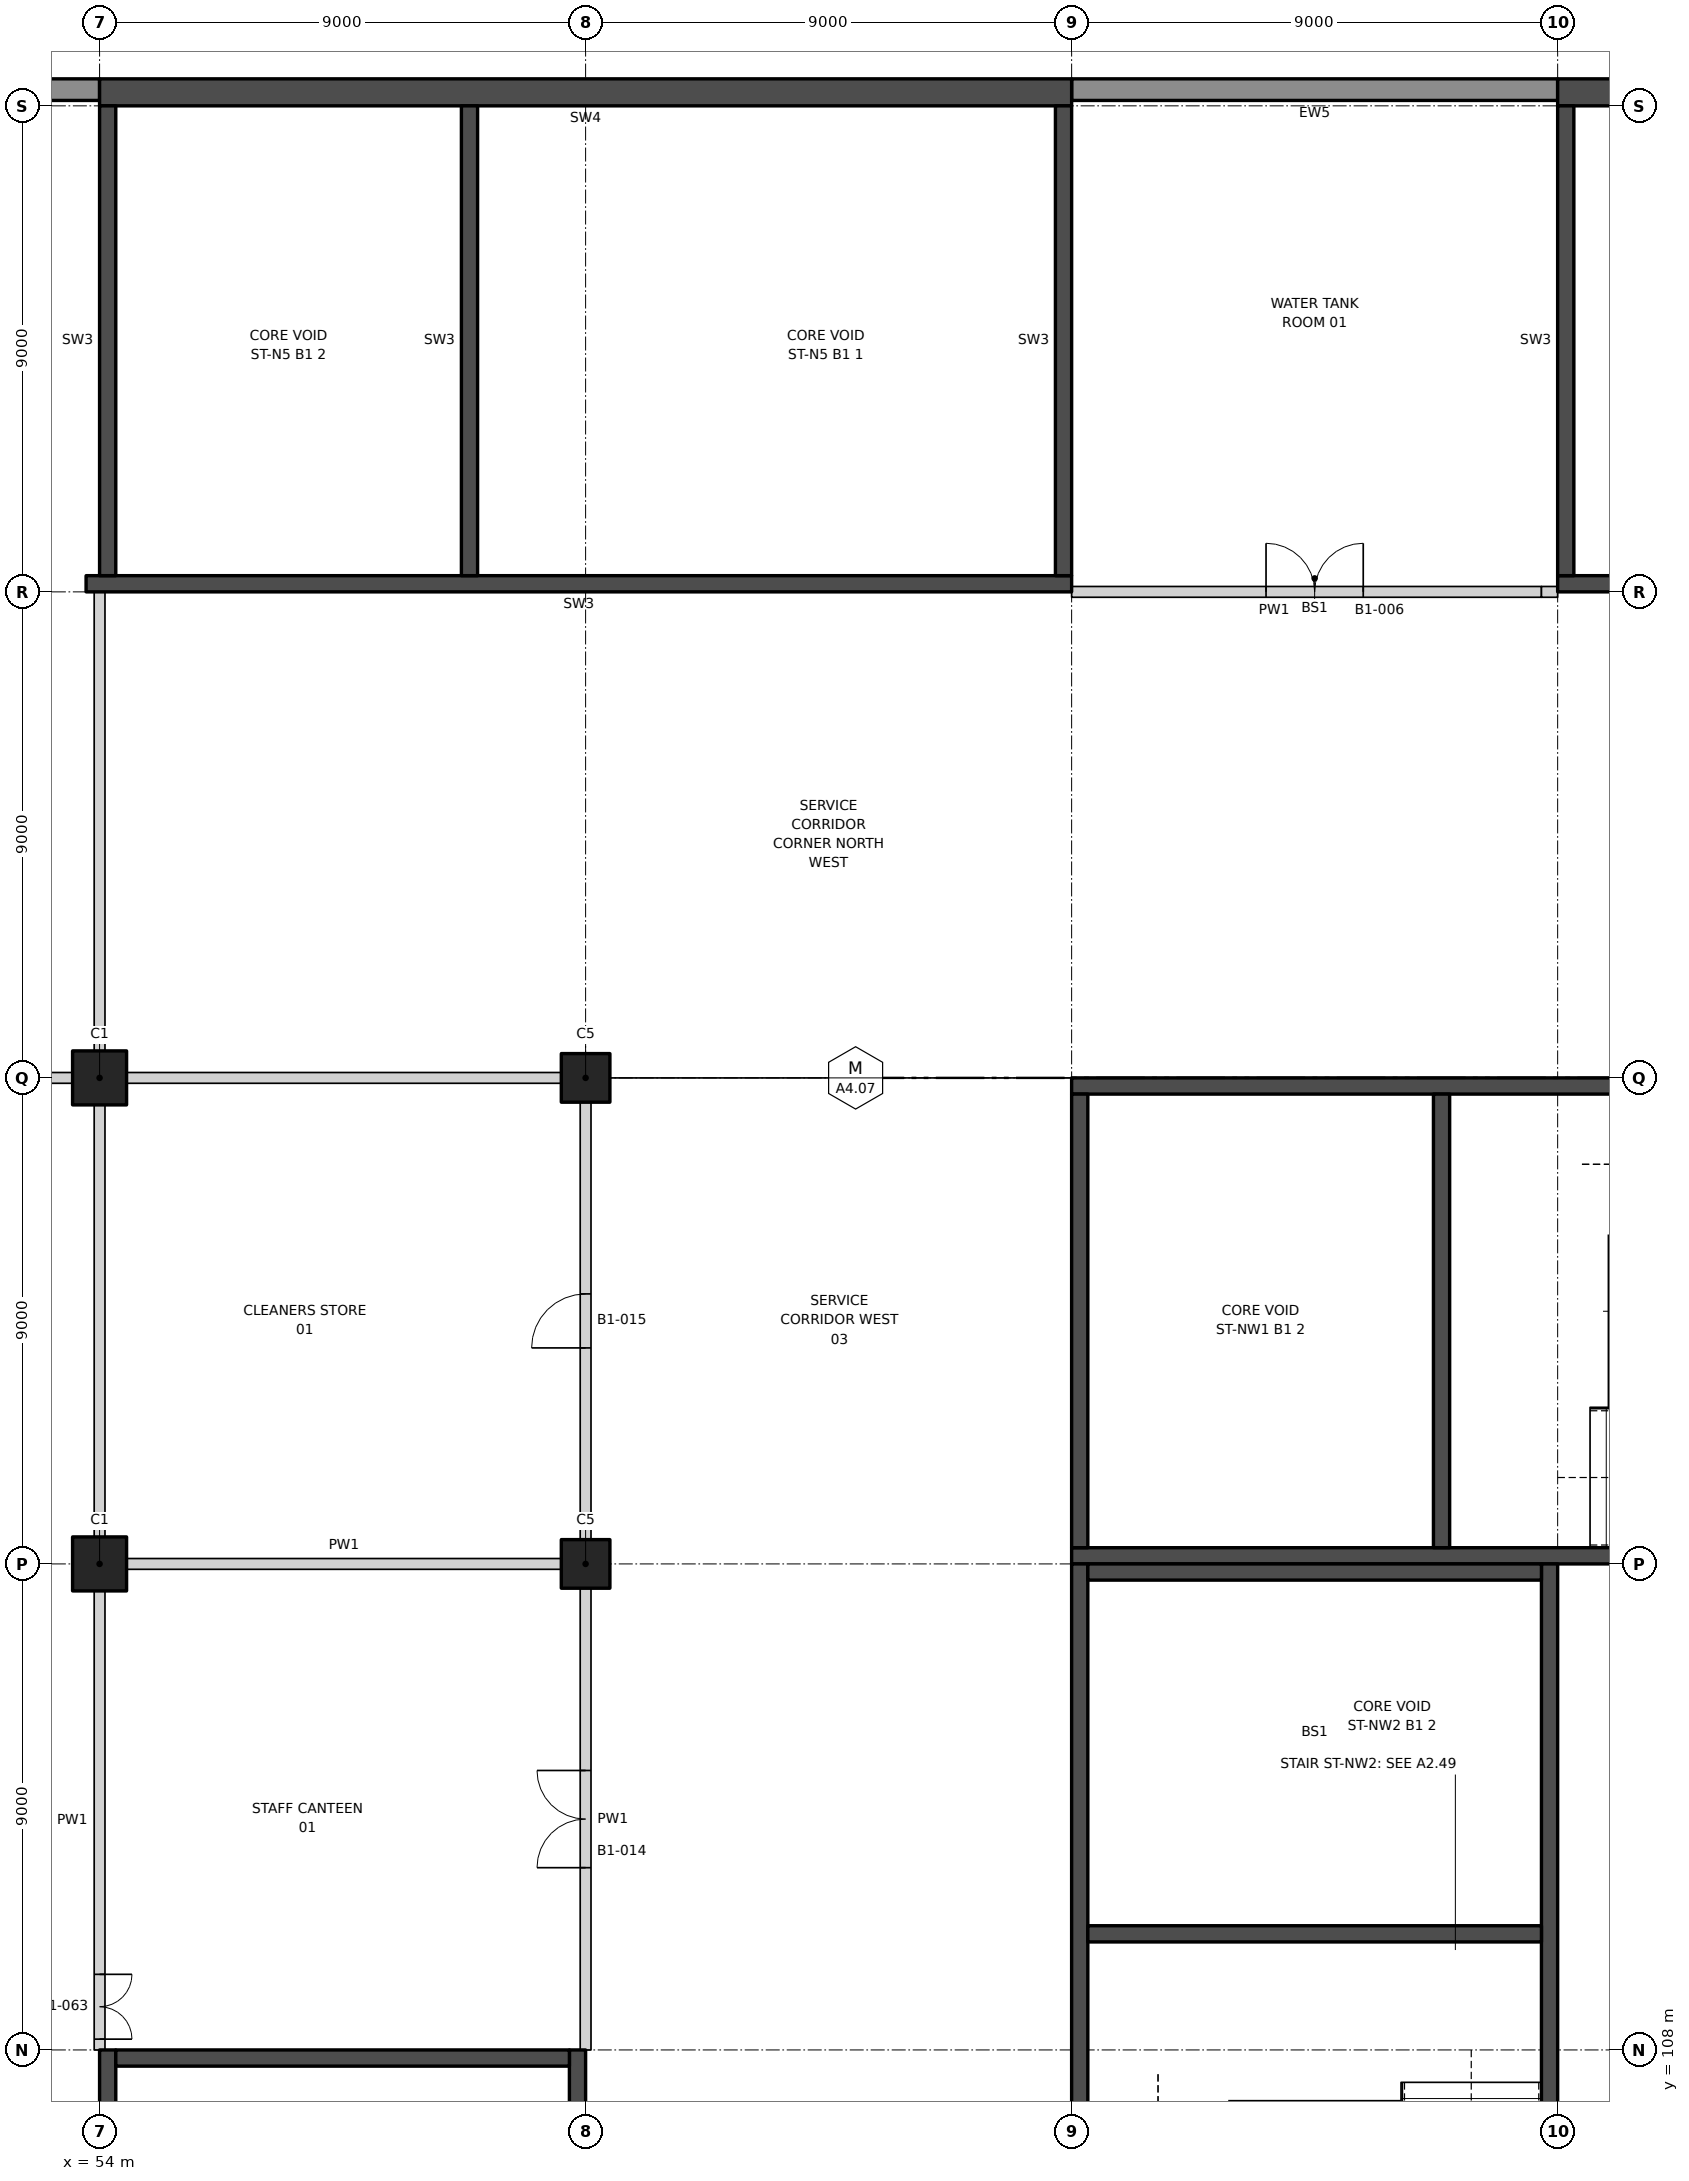
"""IFC4 building model, lengths in metres.
Left out: names, types, materials, properties, quantities, classifications, styles, units other than length and angle.
Written with IfcOpenShell. Run it as: python <this file> out.ifc"""

import sys

from ifc_helpers import new_model, si_unit, direction, frame, frame_2d, origin, origin_2d, place, context, subcontext, project, spatial, rectangle, extrude, element, fill, save


model = new_model("IFC4")
c1 = context("Model", 3, precision=1e-05, world=origin(), true_north=direction((0.0, 1.0)))
c2 = subcontext(c1, "Body", "Model", "MODEL_VIEW")
j1 = project(units=[si_unit("LENGTHUNIT", "METRE"), si_unit("PLANEANGLEUNIT", "RADIAN")], contexts=[c1])
p1 = place(None, origin())
s1 = spatial("IfcSite", under=j1, at=p1, CompositionType="ELEMENT")
p2 = place(p1, origin())
s2 = spatial("IfcBuilding", under=s1, at=p2, CompositionType="ELEMENT")
p3 = place(p2, frame((0.0, 0.0, -6.0)))
s3 = spatial("IfcBuildingStorey", under=s2, at=p3, CompositionType="ELEMENT", Elevation=-6.0)
for number, where, z_axis, x_axis in (
    (1, (54.0, 117.0, 0.0), (0.0, 0.0, 1.0), (1.0, 0.0, 0.0)),
    (2, (54.0, 126.0, 0.0), (0.0, 0.0, 1.0), (1.0, 0.0, 0.0)),
):
    element("IfcColumn", number, at=place(p3, frame(where, z_axis=z_axis, x_axis=x_axis)), inside=s3, PredefinedType="COLUMN", context=c2, shape_type="SweptSolid", body=[
        extrude(rectangle(XDim=1.0, YDim=1.0, at=origin_2d()), origin(), (0.0, 0.0, 1.0), 6.0),
    ])
for number, where, z_axis, x_axis in (
    (3, (63.0, 117.0, 0.0), (0.0, 0.0, 1.0), (1.0, 0.0, 0.0)),
    (4, (63.0, 126.0, 0.0), (0.0, 0.0, 1.0), (1.0, 0.0, 0.0)),
):
    element("IfcColumn", number, at=place(p3, frame(where, z_axis=z_axis, x_axis=x_axis)), inside=s3, PredefinedType="COLUMN", context=c2, shape_type="SweptSolid", body=[
        extrude(rectangle(XDim=0.9, YDim=0.9, at=origin_2d()), origin(), (0.0, 0.0, 1.0), 6.0),
    ])
for number, where, z_axis, x_axis in (
    (5, (54.5, 117.0, 0.0), (0.0, 0.0, 1.0), (1.0, 0.0, 0.0)),
    (6, (45.45, 126.0, 0.0), (0.0, 0.0, 1.0), (1.0, 0.0, 0.0)),
    (7, (54.5, 126.0, 0.0), (0.0, 0.0, 1.0), (1.0, 0.0, 0.0)),
):
    element("IfcWall", number, at=place(p3, frame(where, z_axis=z_axis, x_axis=x_axis)), inside=s3, PredefinedType="PARTITIONING", context=c2, shape_type="SweptSolid", body=[
        extrude(rectangle(XDim=8.05, YDim=0.2, at=frame_2d((4.025, 0.0))), origin(), (0.0, 0.0, 1.0), 4.65),
    ])
p4 = place(p3, frame((72.0, 135.0, 0.0), z_axis=(0.0, 0.0, 1.0), x_axis=(1.0, 0.0, 0.0)))
e8 = element("IfcWall", 8, at=p4, inside=s3, PredefinedType="PARTITIONING", context=c2, shape_type="SweptSolid", body=[
    extrude(rectangle(XDim=8.7, YDim=0.2, at=frame_2d((4.35, 0.0))), origin(), (0.0, 0.0, 1.0), 4.55),
])
p5 = place(p4, frame((3.6, 0.0, 0.0)))
e9 = element("IfcOpeningElement", 9, at=p5, cuts=e8, PredefinedType="OPENING", context=c2, shape_type="SweptSolid", body=[
    extrude(rectangle(XDim=1.8, YDim=2.1, at=frame_2d((0.9, 1.05))), frame((0.0, 0.11, 0.0), z_axis=(0.0, -1.0, 0.0), x_axis=(1.0, 0.0, 0.0)), (0.0, 0.0, 1.0), 0.22),
])
p6 = place(p3, frame((54.0, 108.0, 0.0), z_axis=(0.0, 0.0, 1.0), x_axis=(0.0, 1.0, 0.0)))
e10 = element("IfcWall", 10, at=p6, inside=s3, PredefinedType="PARTITIONING", context=c2, shape_type="SweptSolid", body=[
    extrude(rectangle(XDim=8.5, YDim=0.2, at=frame_2d((4.25, 0.0))), origin(), (0.0, 0.0, 1.0), 4.65),
])
p7 = place(p6, frame((0.2, 0.0, 0.0)))
e11 = element("IfcOpeningElement", 11, at=p7, cuts=e10, PredefinedType="OPENING", context=c2, shape_type="SweptSolid", body=[
    extrude(rectangle(XDim=1.2, YDim=2.1, at=frame_2d((0.6, 1.05))), frame((0.0, 0.11, 0.0), z_axis=(0.0, -1.0, 0.0), x_axis=(1.0, 0.0, 0.0)), (0.0, 0.0, 1.0), 0.22),
])
p8 = place(p3, frame((54.0, 117.5, 0.0), z_axis=(0.0, 0.0, 1.0), x_axis=(0.0, 1.0, 0.0)))
e12 = element("IfcWall", 12, at=p8, inside=s3, PredefinedType="PARTITIONING", context=c2, shape_type="SweptSolid", body=[
    extrude(rectangle(XDim=8.0, YDim=0.2, at=frame_2d((4.0, 0.0))), origin(), (0.0, 0.0, 1.0), 4.65),
])
p9 = place(p3, frame((54.0, 126.5, 0.0), z_axis=(0.0, 0.0, 1.0), x_axis=(0.0, 1.0, 0.0)))
e13 = element("IfcWall", 13, at=p9, inside=s3, PredefinedType="PARTITIONING", context=c2, shape_type="SweptSolid", body=[
    extrude(rectangle(XDim=8.5, YDim=0.2, at=frame_2d((4.25, 0.0))), origin(), (0.0, 0.0, 1.0), 4.65),
])
p10 = place(p3, frame((63.0, 108.0, 0.0), z_axis=(0.0, 0.0, 1.0), x_axis=(0.0, 1.0, 0.0)))
e14 = element("IfcWall", 14, at=p10, inside=s3, PredefinedType="PARTITIONING", context=c2, shape_type="SweptSolid", body=[
    extrude(rectangle(XDim=8.55, YDim=0.2, at=frame_2d((4.275, 0.0))), origin(), (0.0, 0.0, 1.0), 4.55),
])
p11 = place(p10, frame((3.375, 0.0, 0.0)))
e15 = element("IfcOpeningElement", 15, at=p11, cuts=e14, PredefinedType="OPENING", context=c2, shape_type="SweptSolid", body=[
    extrude(rectangle(XDim=1.8, YDim=2.1, at=frame_2d((0.9, 1.05))), frame((0.0, 0.11, 0.0), z_axis=(0.0, -1.0, 0.0), x_axis=(1.0, 0.0, 0.0)), (0.0, 0.0, 1.0), 0.22),
])
p12 = place(p3, frame((63.0, 117.45, 0.0), z_axis=(0.0, 0.0, 1.0), x_axis=(0.0, 1.0, 0.0)))
e16 = element("IfcWall", 16, at=p12, inside=s3, PredefinedType="PARTITIONING", context=c2, shape_type="SweptSolid", body=[
    extrude(rectangle(XDim=8.1, YDim=0.2, at=frame_2d((4.05, 0.0))), origin(), (0.0, 0.0, 1.0), 4.65),
])
p13 = place(p12, frame((3.55, 0.0, 0.0)))
e17 = element("IfcOpeningElement", 17, at=p13, cuts=e16, PredefinedType="OPENING", context=c2, shape_type="SweptSolid", body=[
    extrude(rectangle(XDim=1.0, YDim=2.1, at=frame_2d((0.5, 1.05))), frame((0.0, 0.11, 0.0), z_axis=(0.0, -1.0, 0.0), x_axis=(1.0, 0.0, 0.0)), (0.0, 0.0, 1.0), 0.22),
])
p14 = place(p3, frame((54.0, 144.3, 0.0), z_axis=(0.0, 0.0, 1.0), x_axis=(-1.0, 0.0, 0.0)))
e18 = element("IfcWall", 18, at=p14, inside=s3, PredefinedType="SOLIDWALL", context=c2, shape_type="SweptSolid", body=[
    extrude(rectangle(XDim=8.55, YDim=0.4, at=frame_2d((4.275, 0.0))), origin(), (0.0, 0.0, 1.0), 6.0),
])
p15 = place(p3, frame((81.0, 144.3, 0.0), z_axis=(0.0, 0.0, 1.0), x_axis=(-1.0, 0.0, 0.0)))
e19 = element("IfcWall", 19, at=p15, inside=s3, PredefinedType="SOLIDWALL", context=c2, shape_type="SweptSolid", body=[
    extrude(rectangle(XDim=9.0, YDim=0.4, at=frame_2d((4.5, 0.0))), origin(), (0.0, 0.0, 1.0), 6.0),
])
p16 = place(p3, frame((81.0, 135.15, 0.0), z_axis=(0.0, 0.0, 1.0), x_axis=(1.0, 0.0, 0.0)))
e20 = element("IfcWall", 20, at=p16, inside=s3, PredefinedType="SHEAR", context=c2, shape_type="SweptSolid", body=[
    extrude(rectangle(XDim=18.0, YDim=0.3, at=frame_2d((9.0, 0.0))), origin(), (0.0, 0.0, 1.0), 6.0),
])
p17 = place(p3, frame((81.0, 144.25, 0.0), z_axis=(0.0, 0.0, 1.0), x_axis=(1.0, 0.0, 0.0)))
e21 = element("IfcWall", 21, at=p17, inside=s3, PredefinedType="SHEAR", context=c2, shape_type="SweptSolid", body=[
    extrude(rectangle(XDim=18.0, YDim=0.5, at=frame_2d((9.0, 0.0))), origin(), (0.0, 0.0, 1.0), 6.0),
])
p18 = place(p3, frame((81.15, 135.3, 0.0), z_axis=(0.0, 0.0, 1.0), x_axis=(0.0, 1.0, 0.0)))
e22 = element("IfcWall", 22, at=p18, inside=s3, PredefinedType="SHEAR", context=c2, shape_type="SweptSolid", body=[
    extrude(rectangle(XDim=8.7, YDim=0.3, at=frame_2d((4.35, 0.0))), origin(), (0.0, 0.0, 1.0), 6.0),
])
p19 = place(p3, frame((72.0, 135.15, 0.0), z_axis=(0.0, 0.0, 1.0), x_axis=(-1.0, 0.0, 0.0)))
e23 = element("IfcWall", 23, at=p19, inside=s3, PredefinedType="SHEAR", context=c2, shape_type="SweptSolid", body=[
    extrude(rectangle(XDim=18.25, YDim=0.3, at=frame_2d((9.125, 0.0))), origin(), (0.0, 0.0, 1.0), 6.0),
])
p20 = place(p3, frame((72.0, 144.25, 0.0), z_axis=(0.0, 0.0, 1.0), x_axis=(-1.0, 0.0, 0.0)))
e24 = element("IfcWall", 24, at=p20, inside=s3, PredefinedType="SHEAR", context=c2, shape_type="SweptSolid", body=[
    extrude(rectangle(XDim=18.0, YDim=0.5, at=frame_2d((9.0, 0.0))), origin(), (0.0, 0.0, 1.0), 6.0),
])
for number, where, z_axis, x_axis in (
    (25, (71.85, 135.3, 0.0), (0.0, 0.0, 1.0), (0.0, 1.0, 0.0)),
    (26, (54.15, 135.3, 0.0), (0.0, 0.0, 1.0), (0.0, 1.0, 0.0)),
    (27, (60.85, 135.3, 0.0), (0.0, 0.0, 1.0), (0.0, 1.0, 0.0)),
):
    element("IfcWall", number, at=place(p3, frame(where, z_axis=z_axis, x_axis=x_axis)), inside=s3, PredefinedType="SHEAR", context=c2, shape_type="SweptSolid", body=[
        extrude(rectangle(XDim=8.7, YDim=0.3, at=frame_2d((4.35, 0.0))), origin(), (0.0, 0.0, 1.0), 6.0),
    ])
p21 = place(p3, frame((62.85, 108.0, 0.0), z_axis=(0.0, 0.0, 1.0), x_axis=(0.0, -1.0, 0.0)))
e28 = element("IfcWall", 28, at=p21, inside=s3, PredefinedType="SHEAR", context=c2, shape_type="SweptSolid", body=[
    extrude(rectangle(XDim=18.0, YDim=0.3, at=frame_2d((9.0, 0.0))), origin(), (0.0, 0.0, 1.0), 6.0),
])
p22 = place(p21, frame((8.6, 0.0, 0.0)))
e29 = element("IfcOpeningElement", 29, at=p22, cuts=e28, PredefinedType="OPENING", context=c2, shape_type="SweptSolid", body=[
    extrude(rectangle(XDim=1.2, YDim=2.1, at=frame_2d((0.6, 1.05))), frame((0.0, 0.16, 0.0), z_axis=(0.0, -1.0, 0.0), x_axis=(1.0, 0.0, 0.0)), (0.0, 0.0, 1.0), 0.32),
])
p23 = place(p3, frame((54.15, 108.0, 0.0), z_axis=(0.0, 0.0, 1.0), x_axis=(0.0, -1.0, 0.0)))
e30 = element("IfcWall", 30, at=p23, inside=s3, PredefinedType="SHEAR", context=c2, shape_type="SweptSolid", body=[
    extrude(rectangle(XDim=18.0, YDim=0.3, at=frame_2d((9.0, 0.0))), origin(), (0.0, 0.0, 1.0), 6.0),
])
p24 = place(p23, frame((8.6, 0.0, 0.0)))
e31 = element("IfcOpeningElement", 31, at=p24, cuts=e30, PredefinedType="OPENING", context=c2, shape_type="SweptSolid", body=[
    extrude(rectangle(XDim=1.2, YDim=2.1, at=frame_2d((0.6, 1.05))), frame((0.0, 0.16, 0.0), z_axis=(0.0, -1.0, 0.0), x_axis=(1.0, 0.0, 0.0)), (0.0, 0.0, 1.0), 0.32),
])
p25 = place(p3, frame((62.7, 107.85, 0.0), z_axis=(0.0, 0.0, 1.0), x_axis=(-1.0, 0.0, 0.0)))
e32 = element("IfcWall", 32, at=p25, inside=s3, PredefinedType="SHEAR", context=c2, shape_type="SweptSolid", body=[
    extrude(rectangle(XDim=8.4, YDim=0.3, at=frame_2d((4.2, 0.0))), origin(), (0.0, 0.0, 1.0), 6.0),
])
p26 = place(p3, frame((90.25, 117.15, 0.0), z_axis=(0.0, 0.0, 1.0), x_axis=(-1.0, 0.0, 0.0)))
e33 = element("IfcWall", 33, at=p26, inside=s3, PredefinedType="SHEAR", context=c2, shape_type="SweptSolid", body=[
    extrude(rectangle(XDim=18.25, YDim=0.3, at=frame_2d((9.125, 0.0))), origin(), (0.0, 0.0, 1.0), 6.0),
])
p27 = place(p26, frame((1.75, 0.0, 0.0)))
e34 = element("IfcOpeningElement", 34, at=p27, cuts=e33, PredefinedType="OPENING", context=c2, shape_type="SweptSolid", body=[
    extrude(rectangle(XDim=1.2, YDim=2.1, at=frame_2d((0.6, 1.05))), frame((0.0, 0.16, 0.0), z_axis=(0.0, -1.0, 0.0), x_axis=(1.0, 0.0, 0.0)), (0.0, 0.0, 1.0), 0.32),
])
p28 = place(p3, frame((90.0, 125.85, 0.0), z_axis=(0.0, 0.0, 1.0), x_axis=(-1.0, 0.0, 0.0)))
e35 = element("IfcWall", 35, at=p28, inside=s3, PredefinedType="SHEAR", context=c2, shape_type="SweptSolid", body=[
    extrude(rectangle(XDim=18.0, YDim=0.3, at=frame_2d((9.0, 0.0))), origin(), (0.0, 0.0, 1.0), 6.0),
])
for number, where, z_axis, x_axis in (
    (36, (72.15, 117.3, 0.0), (0.0, 0.0, 1.0), (0.0, 1.0, 0.0)),
    (37, (78.85, 117.3, 0.0), (0.0, 0.0, 1.0), (0.0, 1.0, 0.0)),
):
    element("IfcWall", number, at=place(p3, frame(where, z_axis=z_axis, x_axis=x_axis)), inside=s3, PredefinedType="SHEAR", context=c2, shape_type="SweptSolid", body=[
        extrude(rectangle(XDim=8.4, YDim=0.3, at=frame_2d((4.2, 0.0))), origin(), (0.0, 0.0, 1.0), 6.0),
    ])
p29 = place(p3, frame((80.85, 99.0, 0.0), z_axis=(0.0, 0.0, 1.0), x_axis=(0.0, 1.0, 0.0)))
e38 = element("IfcWall", 38, at=p29, inside=s3, PredefinedType="SHEAR", context=c2, shape_type="SweptSolid", body=[
    extrude(rectangle(XDim=18.0, YDim=0.3, at=frame_2d((9.0, 0.0))), origin(), (0.0, 0.0, 1.0), 6.0),
])
p30 = place(p29, frame((1.5, 0.0, 0.0)))
e39 = element("IfcOpeningElement", 39, at=p30, cuts=e38, PredefinedType="OPENING", context=c2, shape_type="SweptSolid", body=[
    extrude(rectangle(XDim=1.2, YDim=2.1, at=frame_2d((0.6, 1.05))), frame((0.0, 0.16, 0.0), z_axis=(0.0, -1.0, 0.0), x_axis=(1.0, 0.0, 0.0)), (0.0, 0.0, 1.0), 0.32),
])
p31 = place(p3, frame((72.15, 99.0, 0.0), z_axis=(0.0, 0.0, 1.0), x_axis=(0.0, 1.0, 0.0)))
e40 = element("IfcWall", 40, at=p31, inside=s3, PredefinedType="SHEAR", context=c2, shape_type="SweptSolid", body=[
    extrude(rectangle(XDim=18.0, YDim=0.3, at=frame_2d((9.0, 0.0))), origin(), (0.0, 0.0, 1.0), 6.0),
])
for number, where, z_axis, x_axis in (
    (41, (80.7, 116.85, 0.0), (0.0, 0.0, 1.0), (-1.0, 0.0, 0.0)),
    (42, (80.7, 110.15, 0.0), (0.0, 0.0, 1.0), (-1.0, 0.0, 0.0)),
):
    element("IfcWall", number, at=place(p3, frame(where, z_axis=z_axis, x_axis=x_axis)), inside=s3, PredefinedType="SHEAR", context=c2, shape_type="SweptSolid", body=[
        extrude(rectangle(XDim=8.4, YDim=0.3, at=frame_2d((4.2, 0.0))), origin(), (0.0, 0.0, 1.0), 6.0),
    ])
p32 = place(p3, frame((80.7, 135.0, 0.0), z_axis=(0.0, 0.0, 1.0), x_axis=(1.0, 0.0, 0.0)))
e43 = element("IfcWall", 43, at=p32, inside=s3, PredefinedType="PARTITIONING", context=c2, shape_type="SweptSolid", body=[
    extrude(rectangle(XDim=0.3, YDim=0.2, at=frame_2d((0.15, 0.0))), origin(), (0.0, 0.0, 1.0), 6.0),
])
p33 = place(p5, origin())
e44 = element("IfcDoor", 44, at=p33, inside=s3, OperationType="DOUBLE_DOOR_DOUBLE_SWING", PredefinedType="DOOR", context=c2, shape_type="SweptSolid", body=[
    extrude(rectangle(XDim=1.8, YDim=2.1, at=frame_2d((0.9, 1.05))), frame((0.0, 0.025, 0.0), z_axis=(0.0, -1.0, 0.0), x_axis=(1.0, 0.0, 0.0)), (0.0, 0.0, 1.0), 0.05),
])
fill(e9, e44)
p34 = place(p11, origin())
e45 = element("IfcDoor", 45, at=p34, inside=s3, OperationType="DOUBLE_DOOR_DOUBLE_SWING", PredefinedType="DOOR", context=c2, shape_type="SweptSolid", body=[
    extrude(rectangle(XDim=1.8, YDim=2.1, at=frame_2d((0.9, 1.05))), frame((0.0, 0.025, 0.0), z_axis=(0.0, -1.0, 0.0), x_axis=(1.0, 0.0, 0.0)), (0.0, 0.0, 1.0), 0.05),
])
fill(e15, e45)
p35 = place(p13, origin())
e46 = element("IfcDoor", 46, at=p35, inside=s3, OperationType="SINGLE_SWING_LEFT", PredefinedType="DOOR", context=c2, shape_type="SweptSolid", body=[
    extrude(rectangle(XDim=1.0, YDim=2.1, at=frame_2d((0.5, 1.05))), frame((0.0, 0.025, 0.0), z_axis=(0.0, -1.0, 0.0), x_axis=(1.0, 0.0, 0.0)), (0.0, 0.0, 1.0), 0.05),
])
fill(e17, e46)
p36 = place(p7, frame((1.2, 0.0, 0.0), z_axis=(0.0, 0.0, 1.0), x_axis=(-1.0, 0.0, 0.0)))
e47 = element("IfcDoor", 47, at=p36, inside=s3, OperationType="DOUBLE_DOOR_DOUBLE_SWING", PredefinedType="DOOR", context=c2, shape_type="SweptSolid", body=[
    extrude(rectangle(XDim=1.2, YDim=2.1, at=frame_2d((0.6, 1.05))), frame((0.0, 0.025, 0.0), z_axis=(0.0, -1.0, 0.0), x_axis=(1.0, 0.0, 0.0)), (0.0, 0.0, 1.0), 0.05),
])
fill(e11, e47)
save(model, sys.argv[1])
